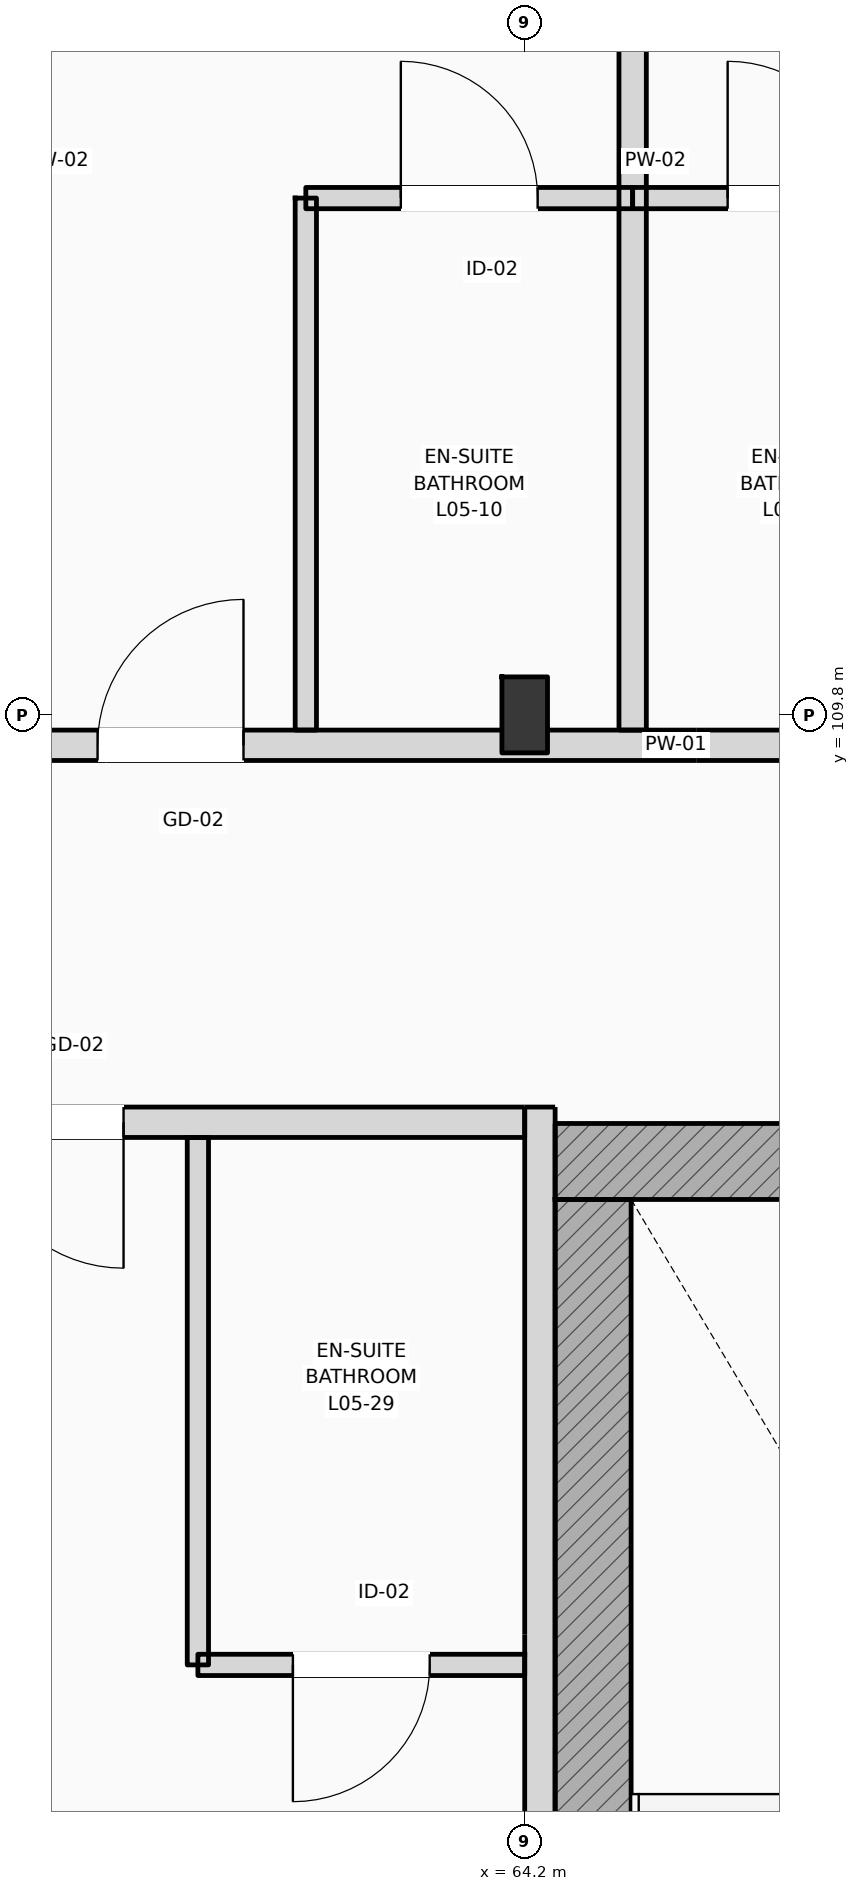
"""IFC4 building model, lengths in metres.
Left out: names, types, materials, properties, quantities, classifications, styles, units other than length and angle.
Written with IfcOpenShell. Run it as: python <this file> out.ifc"""

import sys

from ifc_helpers import new_model, si_unit, direction, frame, frame_2d, origin, origin_2d, place, context, subcontext, project, spatial, rectangle, i_section, extrude, element, fill, save


model = new_model("IFC4")
c1 = context("Model", 3, precision=1e-05, world=origin(), true_north=direction((0.0, 1.0)))
c2 = subcontext(c1, "Body", "Model", "MODEL_VIEW")
j1 = project(units=[si_unit("LENGTHUNIT", "METRE"), si_unit("PLANEANGLEUNIT", "RADIAN")], contexts=[c1])
p1 = place(None, origin())
s1 = spatial("IfcSite", under=j1, at=p1, CompositionType="ELEMENT")
p2 = place(p1, origin())
s2 = spatial("IfcBuilding", under=s1, at=p2, CompositionType="ELEMENT")
p3 = place(p2, frame((0.0, 0.0, 24.6)))
s3 = spatial("IfcBuildingStorey", under=s2, at=p3, CompositionType="ELEMENT", Elevation=24.6)
p4 = place(p3, frame((64.2, 109.8, 0.0), z_axis=(0.0, 0.0, 1.0), x_axis=(1.0, 0.0, 0.0)))
e1 = element("IfcColumn", 1, at=p4, inside=s3, PredefinedType="COLUMN", context=c2, shape_type="SweptSolid", body=[
    extrude(i_section(OverallWidth=0.3, OverallDepth=0.5, WebThickness=0.014, FlangeThickness=0.028, FilletRadius=0.027, at=origin_2d()), origin(), (0.0, 0.0, 1.0), 3.6),
])
p5 = place(p3, frame((64.4, 106.862, 0.0), z_axis=(0.0, 0.0, 1.0), x_axis=(1.0, 0.0, 0.0)))
e2 = element("IfcWall", 2, at=p5, inside=s3, PredefinedType="SHEAR", context=c2, shape_type="SweptSolid", body=[
    extrude(rectangle(XDim=5.16, YDim=0.5, at=frame_2d((2.58, 0.0))), origin(), (0.0, 0.0, 1.0), 3.6),
])
p6 = place(p3, frame((64.65, 97.5, 0.0), z_axis=(0.0, 0.0, 1.0), x_axis=(0.0, 1.0, 0.0)))
e3 = element("IfcWall", 3, at=p6, inside=s3, PredefinedType="SHEAR", context=c2, shape_type="SweptSolid", body=[
    extrude(rectangle(XDim=9.112, YDim=0.5, at=frame_2d((4.556, 0.0))), origin(), (0.0, 0.0, 1.0), 3.6),
])
p7 = place(p3, frame((10.65, 109.6, 0.0), z_axis=(0.0, 0.0, 1.0), x_axis=(1.0, 0.0, 0.0)))
e4 = element("IfcWall", 4, at=p7, inside=s3, PredefinedType="PARTITIONING", context=c2, shape_type="SweptSolid", body=[
    extrude(rectangle(XDim=109.21, YDim=0.2, at=frame_2d((54.605, 0.0))), origin(), (0.0, 0.0, 1.0), 2.78),
])
p8 = place(p7, frame((12.705, 0.0, 0.0)))
e5 = element("IfcOpeningElement", 5, at=p8, cuts=e4, PredefinedType="OPENING", context=c2, shape_type="SweptSolid", body=[
    extrude(rectangle(XDim=1.02, YDim=2.2, at=frame_2d((0.51, 1.1))), frame((0.0, 0.11, 0.0), z_axis=(0.0, -1.0, 0.0), x_axis=(1.0, 0.0, 0.0)), (0.0, 0.0, 1.0), 0.22),
])
p9 = place(p7, frame((19.26, 0.0, 0.0)))
e6 = element("IfcOpeningElement", 6, at=p9, cuts=e4, PredefinedType="OPENING", context=c2, shape_type="SweptSolid", body=[
    extrude(rectangle(XDim=1.02, YDim=2.2, at=frame_2d((0.51, 1.1))), frame((0.0, 0.11, 0.0), z_axis=(0.0, -1.0, 0.0), x_axis=(1.0, 0.0, 0.0)), (0.0, 0.0, 1.0), 0.22),
])
p10 = place(p7, frame((23.71, 0.0, 0.0)))
e7 = element("IfcOpeningElement", 7, at=p10, cuts=e4, PredefinedType="OPENING", context=c2, shape_type="SweptSolid", body=[
    extrude(rectangle(XDim=1.02, YDim=2.2, at=frame_2d((0.51, 1.1))), frame((0.0, 0.11, 0.0), z_axis=(0.0, -1.0, 0.0), x_axis=(1.0, 0.0, 0.0)), (0.0, 0.0, 1.0), 0.22),
])
p11 = place(p7, frame((27.66, 0.0, 0.0)))
e8 = element("IfcOpeningElement", 8, at=p11, cuts=e4, PredefinedType="OPENING", context=c2, shape_type="SweptSolid", body=[
    extrude(rectangle(XDim=1.02, YDim=2.2, at=frame_2d((0.51, 1.1))), frame((0.0, 0.11, 0.0), z_axis=(0.0, -1.0, 0.0), x_axis=(1.0, 0.0, 0.0)), (0.0, 0.0, 1.0), 0.22),
])
p12 = place(p7, frame((31.89, 0.0, 0.0)))
e9 = element("IfcOpeningElement", 9, at=p12, cuts=e4, PredefinedType="OPENING", context=c2, shape_type="SweptSolid", body=[
    extrude(rectangle(XDim=0.96, YDim=2.2, at=frame_2d((0.48, 1.1))), frame((0.0, 0.11, 0.0), z_axis=(0.0, -1.0, 0.0), x_axis=(1.0, 0.0, 0.0)), (0.0, 0.0, 1.0), 0.22),
])
p13 = place(p7, frame((33.94, 0.0, 0.0)))
e10 = element("IfcOpeningElement", 10, at=p13, cuts=e4, PredefinedType="OPENING", context=c2, shape_type="SweptSolid", body=[
    extrude(rectangle(XDim=0.96, YDim=2.2, at=frame_2d((0.48, 1.1))), frame((0.0, 0.11, 0.0), z_axis=(0.0, -1.0, 0.0), x_axis=(1.0, 0.0, 0.0)), (0.0, 0.0, 1.0), 0.22),
])
p14 = place(p7, frame((40.29, 0.0, 0.0)))
e11 = element("IfcOpeningElement", 11, at=p14, cuts=e4, PredefinedType="OPENING", context=c2, shape_type="SweptSolid", body=[
    extrude(rectangle(XDim=0.96, YDim=2.2, at=frame_2d((0.48, 1.1))), frame((0.0, 0.11, 0.0), z_axis=(0.0, -1.0, 0.0), x_axis=(1.0, 0.0, 0.0)), (0.0, 0.0, 1.0), 0.22),
])
p15 = place(p7, frame((42.34, 0.0, 0.0)))
e12 = element("IfcOpeningElement", 12, at=p15, cuts=e4, PredefinedType="OPENING", context=c2, shape_type="SweptSolid", body=[
    extrude(rectangle(XDim=0.96, YDim=2.2, at=frame_2d((0.48, 1.1))), frame((0.0, 0.11, 0.0), z_axis=(0.0, -1.0, 0.0), x_axis=(1.0, 0.0, 0.0)), (0.0, 0.0, 1.0), 0.22),
])
p16 = place(p7, frame((48.69, 0.0, 0.0)))
e13 = element("IfcOpeningElement", 13, at=p16, cuts=e4, PredefinedType="OPENING", context=c2, shape_type="SweptSolid", body=[
    extrude(rectangle(XDim=0.96, YDim=2.2, at=frame_2d((0.48, 1.1))), frame((0.0, 0.11, 0.0), z_axis=(0.0, -1.0, 0.0), x_axis=(1.0, 0.0, 0.0)), (0.0, 0.0, 1.0), 0.22),
])
p17 = place(p7, frame((50.74, 0.0, 0.0)))
e14 = element("IfcOpeningElement", 14, at=p17, cuts=e4, PredefinedType="OPENING", context=c2, shape_type="SweptSolid", body=[
    extrude(rectangle(XDim=0.96, YDim=2.2, at=frame_2d((0.48, 1.1))), frame((0.0, 0.11, 0.0), z_axis=(0.0, -1.0, 0.0), x_axis=(1.0, 0.0, 0.0)), (0.0, 0.0, 1.0), 0.22),
])
p18 = place(p7, frame((57.09, 0.0, 0.0)))
e15 = element("IfcOpeningElement", 15, at=p18, cuts=e4, PredefinedType="OPENING", context=c2, shape_type="SweptSolid", body=[
    extrude(rectangle(XDim=0.96, YDim=2.2, at=frame_2d((0.48, 1.1))), frame((0.0, 0.11, 0.0), z_axis=(0.0, -1.0, 0.0), x_axis=(1.0, 0.0, 0.0)), (0.0, 0.0, 1.0), 0.22),
])
p19 = place(p7, frame((59.14, 0.0, 0.0)))
e16 = element("IfcOpeningElement", 16, at=p19, cuts=e4, PredefinedType="OPENING", context=c2, shape_type="SweptSolid", body=[
    extrude(rectangle(XDim=0.96, YDim=2.2, at=frame_2d((0.48, 1.1))), frame((0.0, 0.11, 0.0), z_axis=(0.0, -1.0, 0.0), x_axis=(1.0, 0.0, 0.0)), (0.0, 0.0, 1.0), 0.22),
])
p20 = place(p7, frame((65.49, 0.0, 0.0)))
e17 = element("IfcOpeningElement", 17, at=p20, cuts=e4, PredefinedType="OPENING", context=c2, shape_type="SweptSolid", body=[
    extrude(rectangle(XDim=0.96, YDim=2.2, at=frame_2d((0.48, 1.1))), frame((0.0, 0.11, 0.0), z_axis=(0.0, -1.0, 0.0), x_axis=(1.0, 0.0, 0.0)), (0.0, 0.0, 1.0), 0.22),
])
p21 = place(p7, frame((67.54, 0.0, 0.0)))
e18 = element("IfcOpeningElement", 18, at=p21, cuts=e4, PredefinedType="OPENING", context=c2, shape_type="SweptSolid", body=[
    extrude(rectangle(XDim=0.96, YDim=2.2, at=frame_2d((0.48, 1.1))), frame((0.0, 0.11, 0.0), z_axis=(0.0, -1.0, 0.0), x_axis=(1.0, 0.0, 0.0)), (0.0, 0.0, 1.0), 0.22),
])
p22 = place(p7, frame((73.89, 0.0, 0.0)))
e19 = element("IfcOpeningElement", 19, at=p22, cuts=e4, PredefinedType="OPENING", context=c2, shape_type="SweptSolid", body=[
    extrude(rectangle(XDim=0.96, YDim=2.2, at=frame_2d((0.48, 1.1))), frame((0.0, 0.11, 0.0), z_axis=(0.0, -1.0, 0.0), x_axis=(1.0, 0.0, 0.0)), (0.0, 0.0, 1.0), 0.22),
])
p23 = place(p7, frame((78.09, 0.0, 0.0)))
e20 = element("IfcOpeningElement", 20, at=p23, cuts=e4, PredefinedType="OPENING", context=c2, shape_type="SweptSolid", body=[
    extrude(rectangle(XDim=0.96, YDim=2.2, at=frame_2d((0.48, 1.1))), frame((0.0, 0.11, 0.0), z_axis=(0.0, -1.0, 0.0), x_axis=(1.0, 0.0, 0.0)), (0.0, 0.0, 1.0), 0.22),
])
p24 = place(p7, frame((82.29, 0.0, 0.0)))
e21 = element("IfcOpeningElement", 21, at=p24, cuts=e4, PredefinedType="OPENING", context=c2, shape_type="SweptSolid", body=[
    extrude(rectangle(XDim=0.96, YDim=2.2, at=frame_2d((0.48, 1.1))), frame((0.0, 0.11, 0.0), z_axis=(0.0, -1.0, 0.0), x_axis=(1.0, 0.0, 0.0)), (0.0, 0.0, 1.0), 0.22),
])
p25 = place(p7, frame((86.49, 0.0, 0.0)))
e22 = element("IfcOpeningElement", 22, at=p25, cuts=e4, PredefinedType="OPENING", context=c2, shape_type="SweptSolid", body=[
    extrude(rectangle(XDim=0.96, YDim=2.2, at=frame_2d((0.48, 1.1))), frame((0.0, 0.11, 0.0), z_axis=(0.0, -1.0, 0.0), x_axis=(1.0, 0.0, 0.0)), (0.0, 0.0, 1.0), 0.22),
])
p26 = place(p7, frame((88.54, 0.0, 0.0)))
e23 = element("IfcOpeningElement", 23, at=p26, cuts=e4, PredefinedType="OPENING", context=c2, shape_type="SweptSolid", body=[
    extrude(rectangle(XDim=0.96, YDim=2.2, at=frame_2d((0.48, 1.1))), frame((0.0, 0.11, 0.0), z_axis=(0.0, -1.0, 0.0), x_axis=(1.0, 0.0, 0.0)), (0.0, 0.0, 1.0), 0.22),
])
p27 = place(p7, frame((94.89, 0.0, 0.0)))
e24 = element("IfcOpeningElement", 24, at=p27, cuts=e4, PredefinedType="OPENING", context=c2, shape_type="SweptSolid", body=[
    extrude(rectangle(XDim=0.96, YDim=2.2, at=frame_2d((0.48, 1.1))), frame((0.0, 0.11, 0.0), z_axis=(0.0, -1.0, 0.0), x_axis=(1.0, 0.0, 0.0)), (0.0, 0.0, 1.0), 0.22),
])
p28 = place(p7, frame((96.94, 0.0, 0.0)))
e25 = element("IfcOpeningElement", 25, at=p28, cuts=e4, PredefinedType="OPENING", context=c2, shape_type="SweptSolid", body=[
    extrude(rectangle(XDim=0.96, YDim=2.2, at=frame_2d((0.48, 1.1))), frame((0.0, 0.11, 0.0), z_axis=(0.0, -1.0, 0.0), x_axis=(1.0, 0.0, 0.0)), (0.0, 0.0, 1.0), 0.22),
])
p29 = place(p7, frame((103.29, 0.0, 0.0)))
e26 = element("IfcOpeningElement", 26, at=p29, cuts=e4, PredefinedType="OPENING", context=c2, shape_type="SweptSolid", body=[
    extrude(rectangle(XDim=0.96, YDim=2.2, at=frame_2d((0.48, 1.1))), frame((0.0, 0.11, 0.0), z_axis=(0.0, -1.0, 0.0), x_axis=(1.0, 0.0, 0.0)), (0.0, 0.0, 1.0), 0.22),
])
p30 = place(p7, frame((105.25, 0.0, 0.0)))
e27 = element("IfcOpeningElement", 27, at=p30, cuts=e4, PredefinedType="OPENING", context=c2, shape_type="SweptSolid", body=[
    extrude(rectangle(XDim=0.96, YDim=2.2, at=frame_2d((0.48, 1.1))), frame((0.0, 0.11, 0.0), z_axis=(0.0, -1.0, 0.0), x_axis=(1.0, 0.0, 0.0)), (0.0, 0.0, 1.0), 0.22),
])
p31 = place(p7, frame((2.716, 0.0, 0.0)))
e28 = element("IfcOpeningElement", 28, at=p31, cuts=e4, PredefinedType="OPENING", context=c2, shape_type="SweptSolid", body=[
    extrude(rectangle(XDim=1.35, YDim=2.25, at=frame_2d((0.675, 1.125))), frame((0.0, 0.11, 0.0), z_axis=(0.0, -1.0, 0.0), x_axis=(1.0, 0.0, 0.0)), (0.0, 0.0, 1.0), 0.22),
])
p32 = place(p7, frame((6.65, 0.0, 0.0)))
e29 = element("IfcOpeningElement", 29, at=p32, cuts=e4, PredefinedType="OPENING", context=c2, shape_type="SweptSolid", body=[
    extrude(rectangle(XDim=1.35, YDim=2.25, at=frame_2d((0.675, 1.125))), frame((0.0, 0.11, 0.0), z_axis=(0.0, -1.0, 0.0), x_axis=(1.0, 0.0, 0.0)), (0.0, 0.0, 1.0), 0.22),
])
p33 = place(p7, frame((10.583, 0.0, 0.0)))
e30 = element("IfcOpeningElement", 30, at=p33, cuts=e4, PredefinedType="OPENING", context=c2, shape_type="SweptSolid", body=[
    extrude(rectangle(XDim=1.35, YDim=2.25, at=frame_2d((0.675, 1.125))), frame((0.0, 0.11, 0.0), z_axis=(0.0, -1.0, 0.0), x_axis=(1.0, 0.0, 0.0)), (0.0, 0.0, 1.0), 0.22),
])
p34 = place(p3, frame((40.76, 107.12, 0.0), z_axis=(0.0, 0.0, 1.0), x_axis=(1.0, 0.0, 0.0)))
e31 = element("IfcWall", 31, at=p34, inside=s3, PredefinedType="PARTITIONING", context=c2, shape_type="SweptSolid", body=[
    extrude(rectangle(XDim=23.44, YDim=0.2, at=frame_2d((11.72, 0.0))), origin(), (0.0, 0.0, 1.0), 3.34),
])
p35 = place(p34, frame((2.449, 0.0, 0.0)))
e32 = element("IfcOpeningElement", 32, at=p35, cuts=e31, PredefinedType="OPENING", context=c2, shape_type="SweptSolid", body=[
    extrude(rectangle(XDim=0.96, YDim=2.2, at=frame_2d((0.48, 1.1))), frame((0.0, 0.11, 0.0), z_axis=(0.0, -1.0, 0.0), x_axis=(1.0, 0.0, 0.0)), (0.0, 0.0, 1.0), 0.22),
])
p36 = place(p34, frame((4.253, 0.0, 0.0)))
e33 = element("IfcOpeningElement", 33, at=p36, cuts=e31, PredefinedType="OPENING", context=c2, shape_type="SweptSolid", body=[
    extrude(rectangle(XDim=0.96, YDim=2.2, at=frame_2d((0.48, 1.1))), frame((0.0, 0.11, 0.0), z_axis=(0.0, -1.0, 0.0), x_axis=(1.0, 0.0, 0.0)), (0.0, 0.0, 1.0), 0.22),
])
p37 = place(p34, frame((10.311, 0.0, 0.0)))
e34 = element("IfcOpeningElement", 34, at=p37, cuts=e31, PredefinedType="OPENING", context=c2, shape_type="SweptSolid", body=[
    extrude(rectangle(XDim=0.96, YDim=2.2, at=frame_2d((0.48, 1.1))), frame((0.0, 0.11, 0.0), z_axis=(0.0, -1.0, 0.0), x_axis=(1.0, 0.0, 0.0)), (0.0, 0.0, 1.0), 0.22),
])
p38 = place(p34, frame((12.069, 0.0, 0.0)))
e35 = element("IfcOpeningElement", 35, at=p38, cuts=e31, PredefinedType="OPENING", context=c2, shape_type="SweptSolid", body=[
    extrude(rectangle(XDim=0.96, YDim=2.2, at=frame_2d((0.48, 1.1))), frame((0.0, 0.11, 0.0), z_axis=(0.0, -1.0, 0.0), x_axis=(1.0, 0.0, 0.0)), (0.0, 0.0, 1.0), 0.22),
])
p39 = place(p34, frame((18.128, 0.0, 0.0)))
e36 = element("IfcOpeningElement", 36, at=p39, cuts=e31, PredefinedType="OPENING", context=c2, shape_type="SweptSolid", body=[
    extrude(rectangle(XDim=0.96, YDim=2.2, at=frame_2d((0.48, 1.1))), frame((0.0, 0.11, 0.0), z_axis=(0.0, -1.0, 0.0), x_axis=(1.0, 0.0, 0.0)), (0.0, 0.0, 1.0), 0.22),
])
p40 = place(p34, frame((19.841, 0.0, 0.0)))
e37 = element("IfcOpeningElement", 37, at=p40, cuts=e31, PredefinedType="OPENING", context=c2, shape_type="SweptSolid", body=[
    extrude(rectangle(XDim=0.96, YDim=2.2, at=frame_2d((0.48, 1.1))), frame((0.0, 0.11, 0.0), z_axis=(0.0, -1.0, 0.0), x_axis=(1.0, 0.0, 0.0)), (0.0, 0.0, 1.0), 0.22),
])
p41 = place(p3, frame((64.3, 96.14, 0.0), z_axis=(0.0, 0.0, 1.0), x_axis=(0.0, 1.0, 0.0)))
e38 = element("IfcWall", 38, at=p41, inside=s3, PredefinedType="PARTITIONING", context=c2, shape_type="SweptSolid", body=[
    extrude(rectangle(XDim=11.08, YDim=0.2, at=frame_2d((5.54, 0.0))), origin(), (0.0, 0.0, 1.0), 2.93),
])
p42 = place(p3, frame((64.91, 109.7, 0.0), z_axis=(0.0, 0.0, 1.0), x_axis=(0.0, 1.0, 0.0)))
e39 = element("IfcWall", 39, at=p42, inside=s3, PredefinedType="PARTITIONING", context=c2, shape_type="SweptSolid", body=[
    extrude(rectangle(XDim=8.15, YDim=0.18, at=frame_2d((4.075, 0.0))), origin(), (0.0, 0.0, 1.0), 3.34),
])
p43 = place(p3, frame((62.76, 109.7, 0.0), z_axis=(0.0, 0.0, 1.0), x_axis=(0.0, 1.0, 0.0)))
e40 = element("IfcWall", 40, at=p43, inside=s3, PredefinedType="PARTITIONING", context=c2, shape_type="SweptSolid", body=[
    extrude(rectangle(XDim=3.5, YDim=0.14, at=frame_2d((1.75, 0.0))), origin(), (0.0, 0.0, 1.0), 3.34),
])
p44 = place(p3, frame((62.76, 113.2, 0.0), z_axis=(0.0, 0.0, 1.0), x_axis=(1.0, 0.0, 0.0)))
e41 = element("IfcWall", 41, at=p44, inside=s3, PredefinedType="PARTITIONING", context=c2, shape_type="SweptSolid", body=[
    extrude(rectangle(XDim=2.15, YDim=0.14, at=frame_2d((1.075, 0.0))), origin(), (0.0, 0.0, 1.0), 3.34),
])
p45 = place(p44, frame((0.625, 0.0, 0.0)))
e42 = element("IfcOpeningElement", 42, at=p45, cuts=e41, PredefinedType="OPENING", context=c2, shape_type="SweptSolid", body=[
    extrude(rectangle(XDim=0.9, YDim=2.1, at=frame_2d((0.45, 1.05))), frame((0.0, 0.08, 0.0), z_axis=(0.0, -1.0, 0.0), x_axis=(1.0, 0.0, 0.0)), (0.0, 0.0, 1.0), 0.16),
])
p46 = place(p3, frame((64.91, 113.2, 0.0), z_axis=(0.0, 0.0, 1.0), x_axis=(1.0, 0.0, 0.0)))
e43 = element("IfcWall", 43, at=p46, inside=s3, PredefinedType="PARTITIONING", context=c2, shape_type="SweptSolid", body=[
    extrude(rectangle(XDim=2.15, YDim=0.14, at=frame_2d((1.075, 0.0))), origin(), (0.0, 0.0, 1.0), 3.34),
])
p47 = place(p46, frame((0.625, 0.0, 0.0)))
e44 = element("IfcOpeningElement", 44, at=p47, cuts=e43, PredefinedType="OPENING", context=c2, shape_type="SweptSolid", body=[
    extrude(rectangle(XDim=0.9, YDim=2.1, at=frame_2d((0.45, 1.05))), frame((0.0, 0.08, 0.0), z_axis=(0.0, -1.0, 0.0), x_axis=(1.0, 0.0, 0.0)), (0.0, 0.0, 1.0), 0.16),
])
p48 = place(p3, frame((62.05, 103.55, 0.0), z_axis=(0.0, 0.0, 1.0), x_axis=(0.0, 1.0, 0.0)))
e45 = element("IfcWall", 45, at=p48, inside=s3, PredefinedType="PARTITIONING", context=c2, shape_type="SweptSolid", body=[
    extrude(rectangle(XDim=3.47, YDim=0.14, at=frame_2d((1.735, 0.0))), origin(), (0.0, 0.0, 1.0), 3.34),
])
p49 = place(p3, frame((62.05, 103.55, 0.0), z_axis=(0.0, 0.0, 1.0), x_axis=(1.0, 0.0, 0.0)))
e46 = element("IfcWall", 46, at=p49, inside=s3, PredefinedType="PARTITIONING", context=c2, shape_type="SweptSolid", body=[
    extrude(rectangle(XDim=2.15, YDim=0.14, at=frame_2d((1.075, 0.0))), origin(), (0.0, 0.0, 1.0), 3.34),
])
p50 = place(p49, frame((0.625, 0.0, 0.0)))
e47 = element("IfcOpeningElement", 47, at=p50, cuts=e46, PredefinedType="OPENING", context=c2, shape_type="SweptSolid", body=[
    extrude(rectangle(XDim=0.9, YDim=2.1, at=frame_2d((0.45, 1.05))), frame((0.0, 0.08, 0.0), z_axis=(0.0, -1.0, 0.0), x_axis=(1.0, 0.0, 0.0)), (0.0, 0.0, 1.0), 0.16),
])
p51 = place(p17, origin())
e48 = element("IfcDoor", 48, at=p51, inside=s3, OperationType="SINGLE_SWING_RIGHT", PredefinedType="DOOR", context=c2, shape_type="SweptSolid", body=[
    extrude(rectangle(XDim=0.96, YDim=2.2, at=frame_2d((0.48, 1.1))), frame((0.0, 0.025, 0.0), z_axis=(0.0, -1.0, 0.0), x_axis=(1.0, 0.0, 0.0)), (0.0, 0.0, 1.0), 0.05),
])
fill(e14, e48)
p52 = place(p45, origin())
e49 = element("IfcDoor", 49, at=p52, inside=s3, OperationType="SINGLE_SWING_LEFT", PredefinedType="DOOR", context=c2, shape_type="SweptSolid", body=[
    extrude(rectangle(XDim=0.9, YDim=2.1, at=frame_2d((0.45, 1.05))), frame((0.0, 0.025, 0.0), z_axis=(0.0, -1.0, 0.0), x_axis=(1.0, 0.0, 0.0)), (0.0, 0.0, 1.0), 0.05),
])
fill(e42, e49)
p53 = place(p47, origin())
e50 = element("IfcDoor", 50, at=p53, inside=s3, OperationType="SINGLE_SWING_LEFT", PredefinedType="DOOR", context=c2, shape_type="SweptSolid", body=[
    extrude(rectangle(XDim=0.9, YDim=2.1, at=frame_2d((0.45, 1.05))), frame((0.0, 0.025, 0.0), z_axis=(0.0, -1.0, 0.0), x_axis=(1.0, 0.0, 0.0)), (0.0, 0.0, 1.0), 0.05),
])
fill(e44, e50)
p54 = place(p40, frame((0.96, 0.0, 0.0), z_axis=(0.0, 0.0, 1.0), x_axis=(-1.0, 0.0, 0.0)))
e51 = element("IfcDoor", 51, at=p54, inside=s3, OperationType="SINGLE_SWING_RIGHT", PredefinedType="DOOR", context=c2, shape_type="SweptSolid", body=[
    extrude(rectangle(XDim=0.96, YDim=2.2, at=frame_2d((0.48, 1.1))), frame((0.0, 0.025, 0.0), z_axis=(0.0, -1.0, 0.0), x_axis=(1.0, 0.0, 0.0)), (0.0, 0.0, 1.0), 0.05),
])
fill(e37, e51)
p55 = place(p50, frame((0.9, 0.0, 0.0), z_axis=(0.0, 0.0, 1.0), x_axis=(-1.0, 0.0, 0.0)))
e52 = element("IfcDoor", 52, at=p55, inside=s3, OperationType="SINGLE_SWING_LEFT", PredefinedType="DOOR", context=c2, shape_type="SweptSolid", body=[
    extrude(rectangle(XDim=0.9, YDim=2.1, at=frame_2d((0.45, 1.05))), frame((0.0, 0.025, 0.0), z_axis=(0.0, -1.0, 0.0), x_axis=(1.0, 0.0, 0.0)), (0.0, 0.0, 1.0), 0.05),
])
fill(e47, e52)
save(model, sys.argv[1])
